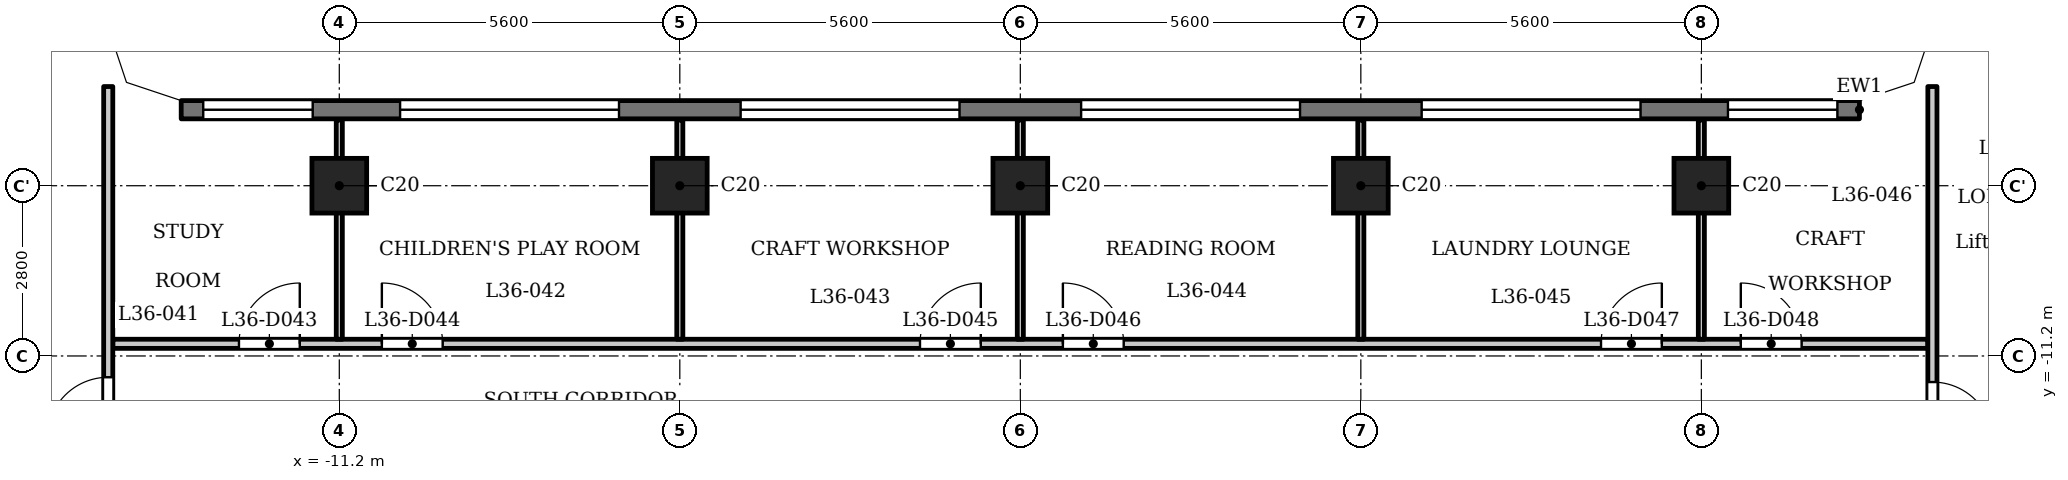
"""IFC4 building model, lengths in metres.
Left out: names, types, materials, properties, quantities, classifications, styles, units other than length and angle.
Written with IfcOpenShell. Run it as: python <this file> out.ifc"""

import sys

from ifc_helpers import new_model, si_unit, direction, frame, frame_2d, origin, origin_2d, place, context, subcontext, project, spatial, polyline, rectangle, outline, extrude, element, fill, save


model = new_model("IFC4")
c1 = context("Model", 3, precision=1e-05, world=origin(), true_north=direction((0.0, 1.0)))
c2 = subcontext(c1, "Body", "Model", "MODEL_VIEW")
j1 = project(units=[si_unit("LENGTHUNIT", "METRE"), si_unit("PLANEANGLEUNIT", "RADIAN")], contexts=[c1])
p1 = place(None, origin())
s1 = spatial("IfcSite", under=j1, at=p1, CompositionType="ELEMENT")
p2 = place(p1, origin())
s2 = spatial("IfcBuilding", under=s1, at=p2, CompositionType="ELEMENT")
p3 = place(p2, frame((0.0, 0.0, 143.1)))
s3 = spatial("IfcBuildingStorey", under=s2, at=p3, CompositionType="ELEMENT", Elevation=143.1)
for number, where, z_axis, x_axis in (
    (1, (-11.2, -8.4, 0.0), (0.0, 0.0, 1.0), (1.0, 0.0, 0.0)),
    (2, (-5.6, -8.4, 0.0), (0.0, 0.0, 1.0), (1.0, 0.0, 0.0)),
    (3, (0.0, -8.4, 0.0), (0.0, 0.0, 1.0), (1.0, 0.0, 0.0)),
    (4, (5.6, -8.4, 0.0), (0.0, 0.0, 1.0), (1.0, 0.0, 0.0)),
    (5, (11.2, -8.4, 0.0), (0.0, 0.0, 1.0), (1.0, 0.0, 0.0)),
):
    element("IfcColumn", number, at=place(p3, frame(where, z_axis=z_axis, x_axis=x_axis)), inside=s3, PredefinedType="COLUMN", context=c2, shape_type="SweptSolid", body=[
        extrude(rectangle(XDim=0.9, YDim=0.9, at=origin_2d()), origin(), (0.0, 0.0, 1.0), 3.5),
    ])
p4 = place(p3, frame((13.8, -7.15, 0.0), z_axis=(0.0, 0.0, 1.0), x_axis=(-1.0, 0.0, 0.0)))
e6 = element("IfcWall", 6, at=p4, inside=s3, PredefinedType="SOLIDWALL", context=c2, shape_type="SweptSolid", body=[
    extrude(rectangle(XDim=27.6, YDim=0.3, at=frame_2d((13.8, 0.0))), origin(), (0.0, 0.0, 1.0), 3.2),
])
p5 = place(p4, frame((0.363, 0.0, 0.9)))
e7 = element("IfcOpeningElement", 7, at=p5, cuts=e6, PredefinedType="OPENING", context=c2, shape_type="SweptSolid", body=[
    extrude(rectangle(XDim=1.8, YDim=1.25, at=frame_2d((0.9, 0.625))), frame((0.0, 0.16, 0.0), z_axis=(0.0, -1.0, 0.0), x_axis=(1.0, 0.0, 0.0)), (0.0, 0.0, 1.0), 0.32),
])
p6 = place(p4, frame((3.6, 0.0, 1.2)))
e8 = element("IfcOpeningElement", 8, at=p6, cuts=e6, PredefinedType="OPENING", context=c2, shape_type="SweptSolid", body=[
    extrude(rectangle(XDim=3.6, YDim=0.95, at=frame_2d((1.8, 0.475))), frame((0.0, 0.16, 0.0), z_axis=(0.0, -1.0, 0.0), x_axis=(1.0, 0.0, 0.0)), (0.0, 0.0, 1.0), 0.32),
])
p7 = place(p4, frame((9.2, 0.0, 1.2)))
e9 = element("IfcOpeningElement", 9, at=p7, cuts=e6, PredefinedType="OPENING", context=c2, shape_type="SweptSolid", body=[
    extrude(rectangle(XDim=3.6, YDim=0.95, at=frame_2d((1.8, 0.475))), frame((0.0, 0.16, 0.0), z_axis=(0.0, -1.0, 0.0), x_axis=(1.0, 0.0, 0.0)), (0.0, 0.0, 1.0), 0.32),
])
p8 = place(p4, frame((14.8, 0.0, 1.2)))
e10 = element("IfcOpeningElement", 10, at=p8, cuts=e6, PredefinedType="OPENING", context=c2, shape_type="SweptSolid", body=[
    extrude(rectangle(XDim=3.6, YDim=0.95, at=frame_2d((1.8, 0.475))), frame((0.0, 0.16, 0.0), z_axis=(0.0, -1.0, 0.0), x_axis=(1.0, 0.0, 0.0)), (0.0, 0.0, 1.0), 0.32),
])
p9 = place(p4, frame((20.4, 0.0, 1.2)))
e11 = element("IfcOpeningElement", 11, at=p9, cuts=e6, PredefinedType="OPENING", context=c2, shape_type="SweptSolid", body=[
    extrude(rectangle(XDim=3.6, YDim=0.95, at=frame_2d((1.8, 0.475))), frame((0.0, 0.16, 0.0), z_axis=(0.0, -1.0, 0.0), x_axis=(1.0, 0.0, 0.0)), (0.0, 0.0, 1.0), 0.32),
])
p10 = place(p4, frame((25.438, 0.0, 0.9)))
e12 = element("IfcOpeningElement", 12, at=p10, cuts=e6, PredefinedType="OPENING", context=c2, shape_type="SweptSolid", body=[
    extrude(rectangle(XDim=1.8, YDim=1.25, at=frame_2d((0.9, 0.625))), frame((0.0, 0.16, 0.0), z_axis=(0.0, -1.0, 0.0), x_axis=(1.0, 0.0, 0.0)), (0.0, 0.0, 1.0), 0.32),
])
p11 = place(p3, frame((-14.925, -11.0, 0.0), z_axis=(0.0, 0.0, 1.0), x_axis=(1.0, 0.0, 0.0)))
e13 = element("IfcWall", 13, at=p11, inside=s3, PredefinedType="PARTITIONING", context=c2, shape_type="SweptSolid", body=[
    extrude(rectangle(XDim=29.85, YDim=0.15, at=frame_2d((14.925, 0.0))), origin(), (0.0, 0.0, 1.0), 3.2),
])
p12 = place(p11, frame((2.075, 0.0, 0.0)))
e14 = element("IfcOpeningElement", 14, at=p12, cuts=e13, PredefinedType="OPENING", context=c2, shape_type="SweptSolid", body=[
    extrude(rectangle(XDim=1.0, YDim=2.1, at=frame_2d((0.5, 1.05))), frame((0.0, 0.085, 0.0), z_axis=(0.0, -1.0, 0.0), x_axis=(1.0, 0.0, 0.0)), (0.0, 0.0, 1.0), 0.17),
])
p13 = place(p11, frame((4.425, 0.0, 0.0)))
e15 = element("IfcOpeningElement", 15, at=p13, cuts=e13, PredefinedType="OPENING", context=c2, shape_type="SweptSolid", body=[
    extrude(rectangle(XDim=1.0, YDim=2.1, at=frame_2d((0.5, 1.05))), frame((0.0, 0.085, 0.0), z_axis=(0.0, -1.0, 0.0), x_axis=(1.0, 0.0, 0.0)), (0.0, 0.0, 1.0), 0.17),
])
p14 = place(p11, frame((13.275, 0.0, 0.0)))
e16 = element("IfcOpeningElement", 16, at=p14, cuts=e13, PredefinedType="OPENING", context=c2, shape_type="SweptSolid", body=[
    extrude(rectangle(XDim=1.0, YDim=2.1, at=frame_2d((0.5, 1.05))), frame((0.0, 0.085, 0.0), z_axis=(0.0, -1.0, 0.0), x_axis=(1.0, 0.0, 0.0)), (0.0, 0.0, 1.0), 0.17),
])
p15 = place(p11, frame((15.625, 0.0, 0.0)))
e17 = element("IfcOpeningElement", 17, at=p15, cuts=e13, PredefinedType="OPENING", context=c2, shape_type="SweptSolid", body=[
    extrude(rectangle(XDim=1.0, YDim=2.1, at=frame_2d((0.5, 1.05))), frame((0.0, 0.085, 0.0), z_axis=(0.0, -1.0, 0.0), x_axis=(1.0, 0.0, 0.0)), (0.0, 0.0, 1.0), 0.17),
])
p16 = place(p11, frame((24.475, 0.0, 0.0)))
e18 = element("IfcOpeningElement", 18, at=p16, cuts=e13, PredefinedType="OPENING", context=c2, shape_type="SweptSolid", body=[
    extrude(rectangle(XDim=1.0, YDim=2.1, at=frame_2d((0.5, 1.05))), frame((0.0, 0.085, 0.0), z_axis=(0.0, -1.0, 0.0), x_axis=(1.0, 0.0, 0.0)), (0.0, 0.0, 1.0), 0.17),
])
p17 = place(p11, frame((26.774, 0.0, 0.0)))
e19 = element("IfcOpeningElement", 19, at=p17, cuts=e13, PredefinedType="OPENING", context=c2, shape_type="SweptSolid", body=[
    extrude(rectangle(XDim=1.0, YDim=2.1, at=frame_2d((0.5, 1.05))), frame((0.0, 0.085, 0.0), z_axis=(0.0, -1.0, 0.0), x_axis=(1.0, 0.0, 0.0)), (0.0, 0.0, 1.0), 0.17),
])
p18 = place(p3, frame((-15.0, -13.125, 0.0), z_axis=(0.0, 0.0, 1.0), x_axis=(0.0, 1.0, 0.0)))
e20 = element("IfcWall", 20, at=p18, inside=s3, PredefinedType="PARTITIONING", context=c2, shape_type="SweptSolid", body=[
    extrude(rectangle(XDim=6.356, YDim=0.15, at=frame_2d((3.178, 0.0))), origin(), (0.0, 0.0, 1.0), 3.2),
])
p19 = place(p18, frame((0.575, 0.0, 0.0)))
e21 = element("IfcOpeningElement", 21, at=p19, cuts=e20, PredefinedType="OPENING", context=c2, shape_type="SweptSolid", body=[
    extrude(rectangle(XDim=1.0, YDim=2.1, at=frame_2d((0.5, 1.05))), frame((0.0, 0.085, 0.0), z_axis=(0.0, -1.0, 0.0), x_axis=(1.0, 0.0, 0.0)), (0.0, 0.0, 1.0), 0.17),
])
for number, where, z_axis, x_axis in (
    (22, (-11.2, -10.925, 0.0), (0.0, 0.0, 1.0), (0.0, 1.0, 0.0)),
    (23, (-5.6, -10.925, 0.0), (0.0, 0.0, 1.0), (0.0, 1.0, 0.0)),
    (24, (0.0, -10.925, 0.0), (0.0, 0.0, 1.0), (0.0, 1.0, 0.0)),
    (25, (5.6, -10.925, 0.0), (0.0, 0.0, 1.0), (0.0, 1.0, 0.0)),
    (26, (11.2, -10.925, 0.0), (0.0, 0.0, 1.0), (0.0, 1.0, 0.0)),
):
    element("IfcWall", number, at=place(p3, frame(where, z_axis=z_axis, x_axis=x_axis)), inside=s3, PredefinedType="PARTITIONING", context=c2, shape_type="SweptSolid", body=[
        extrude(rectangle(XDim=3.605, YDim=0.1, at=frame_2d((1.802, 0.0))), origin(), (0.0, 0.0, 1.0), 3.2),
    ])
p20 = place(p3, frame((15.0, -13.125, 0.0), z_axis=(0.0, 0.0, 1.0), x_axis=(0.0, 1.0, 0.0)))
e27 = element("IfcWall", 27, at=p20, inside=s3, PredefinedType="PARTITIONING", context=c2, shape_type="SweptSolid", body=[
    extrude(rectangle(XDim=6.356, YDim=0.15, at=frame_2d((3.178, 0.0))), origin(), (0.0, 0.0, 1.0), 3.2),
])
p21 = place(p20, frame((0.496, 0.0, 0.0)))
e28 = element("IfcOpeningElement", 28, at=p21, cuts=e27, PredefinedType="OPENING", context=c2, shape_type="SweptSolid", body=[
    extrude(rectangle(XDim=1.0, YDim=2.1, at=frame_2d((0.5, 1.05))), frame((0.0, 0.085, 0.0), z_axis=(0.0, -1.0, 0.0), x_axis=(1.0, 0.0, 0.0)), (0.0, 0.0, 1.0), 0.17),
])
p22 = place(p3, origin())
e29 = element("IfcWall", 29, at=p22, inside=s3, PredefinedType="SOLIDWALL", context=c2, shape_type="SweptSolid", body=[
    extrude(outline(polyline([(14.937, -6.937), (15.3, -5.849), (15.3, -5.8), (15.0, -5.8), (14.7, -6.7), (13.8, -7.0), (13.8, -7.3), (13.849, -7.3), (14.937, -6.937)])), origin(), (0.0, 0.0, 1.0), 3.2),
])
e30 = element("IfcWall", 30, at=p22, inside=s3, PredefinedType="SOLIDWALL", context=c2, shape_type="SweptSolid", body=[
    extrude(outline(polyline([(-14.937, -6.937), (-13.849, -7.3), (-13.8, -7.3), (-13.8, -7.0), (-14.7, -6.7), (-15.0, -5.8), (-15.3, -5.8), (-15.3, -5.849), (-14.937, -6.937)])), origin(), (0.0, 0.0, 1.0), 3.2),
])
p23 = place(p19, origin())
e31 = element("IfcDoor", 31, at=p23, inside=s3, OperationType="SINGLE_SWING_RIGHT", PredefinedType="DOOR", context=c2, shape_type="SweptSolid", body=[
    extrude(rectangle(XDim=1.0, YDim=2.1, at=frame_2d((0.5, 1.05))), frame((0.0, 0.025, 0.0), z_axis=(0.0, -1.0, 0.0), x_axis=(1.0, 0.0, 0.0)), (0.0, 0.0, 1.0), 0.05),
])
fill(e21, e31)
p24 = place(p21, origin())
e32 = element("IfcDoor", 32, at=p24, inside=s3, OperationType="SINGLE_SWING_LEFT", PredefinedType="DOOR", context=c2, shape_type="SweptSolid", body=[
    extrude(rectangle(XDim=1.0, YDim=2.1, at=frame_2d((0.5, 1.05))), frame((0.0, 0.025, 0.0), z_axis=(0.0, -1.0, 0.0), x_axis=(1.0, 0.0, 0.0)), (0.0, 0.0, 1.0), 0.05),
])
fill(e28, e32)
p25 = place(p12, origin())
e33 = element("IfcDoor", 33, at=p25, inside=s3, OperationType="SINGLE_SWING_LEFT", PredefinedType="DOOR", context=c2, shape_type="SweptSolid", body=[
    extrude(rectangle(XDim=1.0, YDim=2.1, at=frame_2d((0.5, 1.05))), frame((0.0, 0.025, 0.0), z_axis=(0.0, -1.0, 0.0), x_axis=(1.0, 0.0, 0.0)), (0.0, 0.0, 1.0), 0.05),
])
fill(e14, e33)
p26 = place(p13, origin())
e34 = element("IfcDoor", 34, at=p26, inside=s3, OperationType="SINGLE_SWING_RIGHT", PredefinedType="DOOR", context=c2, shape_type="SweptSolid", body=[
    extrude(rectangle(XDim=1.0, YDim=2.1, at=frame_2d((0.5, 1.05))), frame((0.0, 0.025, 0.0), z_axis=(0.0, -1.0, 0.0), x_axis=(1.0, 0.0, 0.0)), (0.0, 0.0, 1.0), 0.05),
])
fill(e15, e34)
p27 = place(p14, origin())
e35 = element("IfcDoor", 35, at=p27, inside=s3, OperationType="SINGLE_SWING_LEFT", PredefinedType="DOOR", context=c2, shape_type="SweptSolid", body=[
    extrude(rectangle(XDim=1.0, YDim=2.1, at=frame_2d((0.5, 1.05))), frame((0.0, 0.025, 0.0), z_axis=(0.0, -1.0, 0.0), x_axis=(1.0, 0.0, 0.0)), (0.0, 0.0, 1.0), 0.05),
])
fill(e16, e35)
p28 = place(p15, origin())
e36 = element("IfcDoor", 36, at=p28, inside=s3, OperationType="SINGLE_SWING_RIGHT", PredefinedType="DOOR", context=c2, shape_type="SweptSolid", body=[
    extrude(rectangle(XDim=1.0, YDim=2.1, at=frame_2d((0.5, 1.05))), frame((0.0, 0.025, 0.0), z_axis=(0.0, -1.0, 0.0), x_axis=(1.0, 0.0, 0.0)), (0.0, 0.0, 1.0), 0.05),
])
fill(e17, e36)
p29 = place(p16, origin())
e37 = element("IfcDoor", 37, at=p29, inside=s3, OperationType="SINGLE_SWING_LEFT", PredefinedType="DOOR", context=c2, shape_type="SweptSolid", body=[
    extrude(rectangle(XDim=1.0, YDim=2.1, at=frame_2d((0.5, 1.05))), frame((0.0, 0.025, 0.0), z_axis=(0.0, -1.0, 0.0), x_axis=(1.0, 0.0, 0.0)), (0.0, 0.0, 1.0), 0.05),
])
fill(e18, e37)
p30 = place(p17, origin())
e38 = element("IfcDoor", 38, at=p30, inside=s3, OperationType="SINGLE_SWING_RIGHT", PredefinedType="DOOR", context=c2, shape_type="SweptSolid", body=[
    extrude(rectangle(XDim=1.0, YDim=2.1, at=frame_2d((0.5, 1.05))), frame((0.0, 0.025, 0.0), z_axis=(0.0, -1.0, 0.0), x_axis=(1.0, 0.0, 0.0)), (0.0, 0.0, 1.0), 0.05),
])
fill(e19, e38)
p31 = place(p5, origin())
e39 = element("IfcWindow", 39, at=p31, inside=s3, PartitioningType="SINGLE_PANEL", PredefinedType="WINDOW", context=c2, shape_type="SweptSolid", body=[
    extrude(rectangle(XDim=1.8, YDim=1.25, at=frame_2d((0.9, 0.625))), frame((0.0, 0.03, 0.0), z_axis=(0.0, -1.0, 0.0), x_axis=(1.0, 0.0, 0.0)), (0.0, 0.0, 1.0), 0.06),
])
fill(e7, e39)
p32 = place(p6, origin())
e40 = element("IfcWindow", 40, at=p32, inside=s3, PartitioningType="SINGLE_PANEL", PredefinedType="WINDOW", context=c2, shape_type="SweptSolid", body=[
    extrude(rectangle(XDim=3.6, YDim=0.95, at=frame_2d((1.8, 0.475))), frame((0.0, 0.03, 0.0), z_axis=(0.0, -1.0, 0.0), x_axis=(1.0, 0.0, 0.0)), (0.0, 0.0, 1.0), 0.06),
])
fill(e8, e40)
p33 = place(p7, origin())
e41 = element("IfcWindow", 41, at=p33, inside=s3, PartitioningType="SINGLE_PANEL", PredefinedType="WINDOW", context=c2, shape_type="SweptSolid", body=[
    extrude(rectangle(XDim=3.6, YDim=0.95, at=frame_2d((1.8, 0.475))), frame((0.0, 0.03, 0.0), z_axis=(0.0, -1.0, 0.0), x_axis=(1.0, 0.0, 0.0)), (0.0, 0.0, 1.0), 0.06),
])
fill(e9, e41)
p34 = place(p8, origin())
e42 = element("IfcWindow", 42, at=p34, inside=s3, PartitioningType="SINGLE_PANEL", PredefinedType="WINDOW", context=c2, shape_type="SweptSolid", body=[
    extrude(rectangle(XDim=3.6, YDim=0.95, at=frame_2d((1.8, 0.475))), frame((0.0, 0.03, 0.0), z_axis=(0.0, -1.0, 0.0), x_axis=(1.0, 0.0, 0.0)), (0.0, 0.0, 1.0), 0.06),
])
fill(e10, e42)
p35 = place(p9, origin())
e43 = element("IfcWindow", 43, at=p35, inside=s3, PartitioningType="SINGLE_PANEL", PredefinedType="WINDOW", context=c2, shape_type="SweptSolid", body=[
    extrude(rectangle(XDim=3.6, YDim=0.95, at=frame_2d((1.8, 0.475))), frame((0.0, 0.03, 0.0), z_axis=(0.0, -1.0, 0.0), x_axis=(1.0, 0.0, 0.0)), (0.0, 0.0, 1.0), 0.06),
])
fill(e11, e43)
p36 = place(p10, origin())
e44 = element("IfcWindow", 44, at=p36, inside=s3, PartitioningType="SINGLE_PANEL", PredefinedType="WINDOW", context=c2, shape_type="SweptSolid", body=[
    extrude(rectangle(XDim=1.8, YDim=1.25, at=frame_2d((0.9, 0.625))), frame((0.0, 0.03, 0.0), z_axis=(0.0, -1.0, 0.0), x_axis=(1.0, 0.0, 0.0)), (0.0, 0.0, 1.0), 0.06),
])
fill(e12, e44)
save(model, sys.argv[1])
